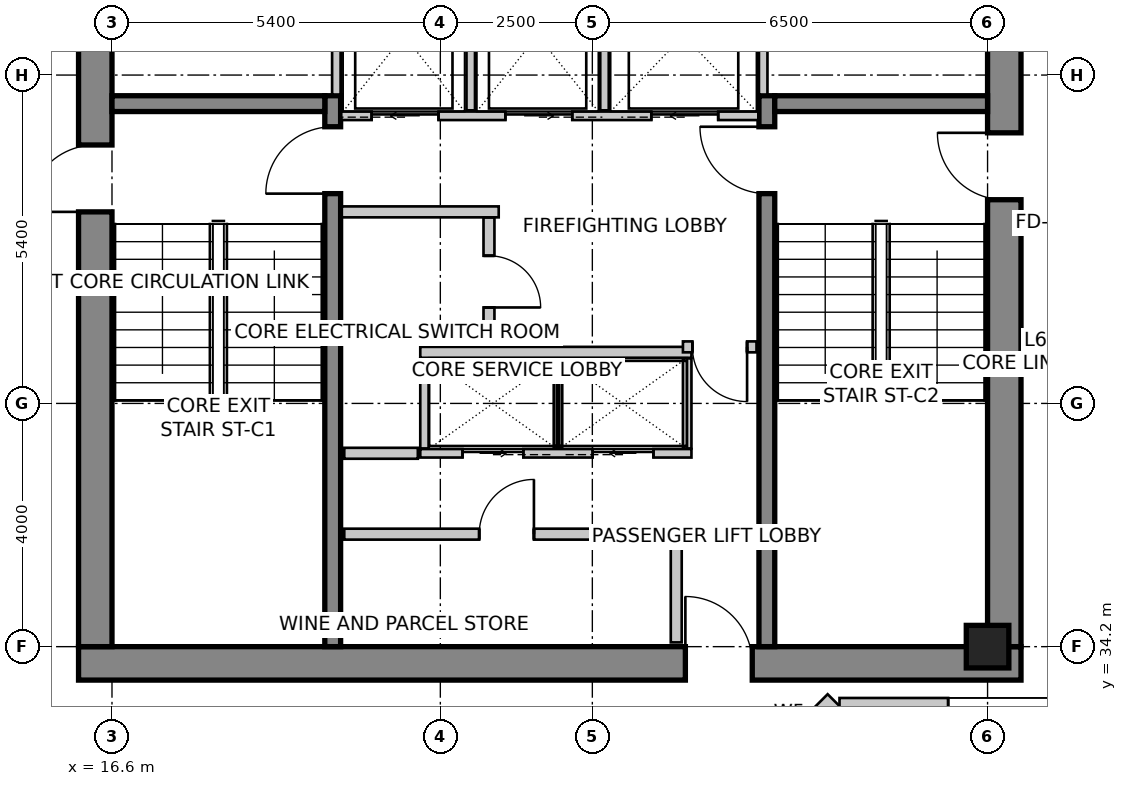
"""IFC4 building model, lengths in metres.
Left out: names, types, materials, properties, quantities, classifications, styles, units other than length and angle.
Written with IfcOpenShell. Run it as: python <this file> out.ifc"""

import sys

from ifc_helpers import new_model, si_unit, direction, frame, frame_2d, origin, origin_2d, place, context, subcontext, project, spatial, rectangle, extrude, source, transform, mapped, element, fill, save


model = new_model("IFC4")
c1 = context("Model", 3, precision=1e-05, world=origin(), true_north=direction((0.0, 1.0)))
c2 = subcontext(c1, "Body", "Model", "MODEL_VIEW")
j1 = project(units=[si_unit("LENGTHUNIT", "METRE"), si_unit("PLANEANGLEUNIT", "RADIAN")], contexts=[c1])
p1 = place(None, origin())
s1 = spatial("IfcSite", under=j1, at=p1, CompositionType="ELEMENT")
p2 = place(p1, origin())
s2 = spatial("IfcBuilding", under=s1, at=p2, CompositionType="ELEMENT")
p3 = place(p2, frame((0.0, 0.0, 270.9)))
s3 = spatial("IfcBuildingStorey", under=s2, at=p3, CompositionType="ELEMENT", Elevation=270.9)
p4 = place(p3, frame((16.05, 33.925, 0.0), z_axis=(0.0, 0.0, 1.0), x_axis=(1.0, 0.0, 0.0)))
e1 = element("IfcWall", 1, at=p4, inside=s3, PredefinedType="SHEAR", context=c2, shape_type="SweptSolid", body=[
    extrude(rectangle(XDim=15.5, YDim=0.55, at=frame_2d((7.75, 0.0))), origin(), (0.0, 0.0, 1.0), 3.6),
])
m1 = source(origin(), c2, "Body", "SweptSolid", [
    extrude(rectangle(XDim=1.1, YDim=2.15, at=frame_2d((0.55, 1.075))), frame((0.0, 0.285, 0.0), z_axis=(0.0, -1.0, 0.0), x_axis=(1.0, 0.0, 0.0)), (0.0, 0.0, 1.0), 0.57),
])
p5 = place(p4, frame((9.98, 0.0, 0.0)))
e2 = element("IfcOpeningElement", 2, at=p5, cuts=e1, PredefinedType="OPENING", context=c2, shape_type="MappedRepresentation", body=[
    mapped(m1, transform((0.0, 0.0, 0.0), scale=1.0)),
])
p6 = place(p3, frame((16.325, 34.2, 0.0), z_axis=(0.0, 0.0, 1.0), x_axis=(0.0, 1.0, 0.0)))
e3 = element("IfcWall", 3, at=p6, inside=s3, PredefinedType="SHEAR", context=c2, shape_type="SweptSolid", body=[
    extrude(rectangle(XDim=11.4, YDim=0.55, at=frame_2d((5.7, 0.0))), origin(), (0.0, 0.0, 1.0), 3.6),
])
p7 = place(p6, frame((7.15, 0.0, 0.0)))
e4 = element("IfcOpeningElement", 4, at=p7, cuts=e3, PredefinedType="OPENING", context=c2, shape_type="MappedRepresentation", body=[
    mapped(m1, transform((0.0, 0.0, 0.0), scale=1.0)),
])
p8 = place(p3, frame((31.275, 34.2, 0.0), z_axis=(0.0, 0.0, 1.0), x_axis=(0.0, 1.0, 0.0)))
e5 = element("IfcWall", 5, at=p8, inside=s3, PredefinedType="SHEAR", context=c2, shape_type="SweptSolid", body=[
    extrude(rectangle(XDim=11.4, YDim=0.55, at=frame_2d((5.7, 0.0))), origin(), (0.0, 0.0, 1.0), 3.6),
])
p9 = place(p8, frame((7.35, 0.0, 0.0)))
e6 = element("IfcOpeningElement", 6, at=p9, cuts=e5, PredefinedType="OPENING", context=c2, shape_type="MappedRepresentation", body=[
    mapped(m1, transform((0.0, 0.0, 0.0), scale=1.0)),
])
p10 = place(p3, frame((20.23, 34.2, 0.0), z_axis=(0.0, 0.0, 1.0), x_axis=(0.0, 1.0, 0.0)))
e7 = element("IfcWall", 7, at=p10, inside=s3, PredefinedType="SHEAR", context=c2, shape_type="SweptSolid", body=[
    extrude(rectangle(XDim=9.06, YDim=0.26, at=frame_2d((4.53, 0.0))), origin(), (0.0, 0.0, 1.0), 3.6),
])
m2 = source(origin(), c2, "Body", "SweptSolid", [
    extrude(rectangle(XDim=1.1, YDim=2.15, at=frame_2d((0.55, 1.075))), frame((0.0, 0.14, 0.0), z_axis=(0.0, -1.0, 0.0), x_axis=(1.0, 0.0, 0.0)), (0.0, 0.0, 1.0), 0.28),
])
p11 = place(p10, frame((7.45, 0.0, 0.0)))
e8 = element("IfcOpeningElement", 8, at=p11, cuts=e7, PredefinedType="OPENING", context=c2, shape_type="MappedRepresentation", body=[
    mapped(m2, transform((0.0, 0.0, 0.0), scale=1.0)),
])
p12 = place(p3, frame((27.37, 34.2, 0.0), z_axis=(0.0, 0.0, 1.0), x_axis=(0.0, 1.0, 0.0)))
e9 = element("IfcWall", 9, at=p12, inside=s3, PredefinedType="SHEAR", context=c2, shape_type="SweptSolid", body=[
    extrude(rectangle(XDim=9.06, YDim=0.26, at=frame_2d((4.53, 0.0))), origin(), (0.0, 0.0, 1.0), 3.6),
])
p13 = place(p12, frame((7.45, 0.0, 0.0)))
e10 = element("IfcOpeningElement", 10, at=p13, cuts=e9, PredefinedType="OPENING", context=c2, shape_type="MappedRepresentation", body=[
    mapped(m2, transform((0.0, 0.0, 0.0), scale=1.0)),
])
for number, where, z_axis, x_axis in (
    (11, (16.6, 43.13, 0.0), (0.0, 0.0, 1.0), (1.0, 0.0, 0.0)),
    (12, (27.5, 43.13, 0.0), (0.0, 0.0, 1.0), (1.0, 0.0, 0.0)),
):
    element("IfcWall", number, at=place(p3, frame(where, z_axis=z_axis, x_axis=x_axis)), inside=s3, PredefinedType="SHEAR", context=c2, shape_type="SweptSolid", body=[
        extrude(rectangle(XDim=3.5, YDim=0.26, at=frame_2d((1.75, 0.0))), origin(), (0.0, 0.0, 1.0), 3.6),
    ])
m3 = source(origin(), c2, "Body", "SweptSolid", [
    extrude(rectangle(XDim=0.7, YDim=0.7, at=origin_2d()), origin(), (0.0, 0.0, 1.0), 3.6),
])
p14 = place(p3, frame((31.0, 34.2, 0.0), z_axis=(0.0, 0.0, 1.0), x_axis=(1.0, 0.0, 0.0)))
e13 = element("IfcColumn", 13, at=p14, inside=s3, PredefinedType="COLUMN", context=c2, shape_type="MappedRepresentation", body=[
    mapped(m3, transform((0.0, 0.0, 0.0), scale=1.0)),
])
p15 = place(p3, frame((26.42, 31.256, 0.0), z_axis=(0.0, 0.0, 1.0), x_axis=(0.707106781187, 0.707106781187, 0.0)))
e14 = element("IfcWall", 14, at=p15, inside=s3, PredefinedType="SOLIDWALL", context=c2, shape_type="SweptSolid", body=[
    extrude(rectangle(XDim=2.907, YDim=0.3, at=frame_2d((1.454, 0.0))), origin(), (0.0, 0.0, 1.0), 3.35),
])
m4 = source(origin(), c2, "Body", "SweptSolid", [
    extrude(rectangle(XDim=1.2, YDim=1.6, at=frame_2d((0.6, 0.8))), frame((0.0, 0.16, 0.0), z_axis=(0.0, -1.0, 0.0), x_axis=(1.0, 0.0, 0.0)), (0.0, 0.0, 1.0), 0.32),
])
p16 = place(p15, frame((1.272, 0.0, 0.85)))
e15 = element("IfcOpeningElement", 15, at=p16, cuts=e14, PredefinedType="OPENING", context=c2, shape_type="MappedRepresentation", body=[
    mapped(m4, transform((0.0, 0.0, 0.0), scale=1.0)),
])
p17 = place(p3, frame((28.565, 33.206, 0.0), z_axis=(0.0, 0.0, 1.0), x_axis=(1.0, 0.0, 0.0)))
e16 = element("IfcWall", 16, at=p17, inside=s3, PredefinedType="SOLIDWALL", context=c2, shape_type="SweptSolid", body=[
    extrude(rectangle(XDim=13.423, YDim=0.3, at=frame_2d((6.711, 0.0))), origin(), (0.0, 0.0, 1.0), 3.35),
])
m5 = source(origin(), c2, "Body", "SweptSolid", [
    extrude(rectangle(XDim=1.6, YDim=2.15, at=frame_2d((0.8, 1.075))), frame((0.0, 0.16, 0.0), z_axis=(0.0, -1.0, 0.0), x_axis=(1.0, 0.0, 0.0)), (0.0, 0.0, 1.0), 0.32),
])
p18 = place(p17, frame((5.635, 0.0, 0.0)))
e17 = element("IfcOpeningElement", 17, at=p18, cuts=e16, PredefinedType="OPENING", context=c2, shape_type="MappedRepresentation", body=[
    mapped(m5, transform((0.0, 0.0, 0.0), scale=1.0)),
])
m6 = source(origin(), c2, "Body", "SweptSolid", [
    extrude(rectangle(XDim=2.1, YDim=2.0, at=frame_2d((1.05, 1.0))), frame((0.0, 0.16, 0.0), z_axis=(0.0, -1.0, 0.0), x_axis=(1.0, 0.0, 0.0)), (0.0, 0.0, 1.0), 0.32),
])
p19 = place(p17, frame((1.787, 0.0, 0.85)))
e18 = element("IfcOpeningElement", 18, at=p19, cuts=e16, PredefinedType="OPENING", context=c2, shape_type="MappedRepresentation", body=[
    mapped(m6, transform((0.0, 0.0, 0.0), scale=1.0)),
])
p20 = place(p17, frame((9.259, 0.0, 0.85)))
e19 = element("IfcOpeningElement", 19, at=p20, cuts=e16, PredefinedType="OPENING", context=c2, shape_type="MappedRepresentation", body=[
    mapped(m6, transform((0.0, 0.0, 0.0), scale=1.0)),
])
p21 = place(p3, frame((20.37, 42.93, 0.0), z_axis=(0.0, 0.0, 1.0), x_axis=(1.0, 0.0, 0.0)))
e20 = element("IfcWall", 20, at=p21, inside=s3, PredefinedType="SOLIDWALL", context=c2, shape_type="SweptSolid", body=[
    extrude(rectangle(XDim=6.86, YDim=0.14, at=frame_2d((3.43, 0.0))), origin(), (0.0, 0.0, 1.0), 3.35),
])
m7 = source(origin(), c2, "Body", "SweptSolid", [
    extrude(rectangle(XDim=1.1, YDim=2.15, at=frame_2d((0.55, 1.075))), frame((0.0, 0.08, 0.0), z_axis=(0.0, -1.0, 0.0), x_axis=(1.0, 0.0, 0.0)), (0.0, 0.0, 1.0), 0.16),
])
p22 = place(p21, frame((0.5, 0.0, 0.0)))
e21 = element("IfcOpeningElement", 21, at=p22, cuts=e20, PredefinedType="OPENING", context=c2, shape_type="MappedRepresentation", body=[
    mapped(m7, transform((0.0, 0.0, 0.0), scale=1.0)),
])
p23 = place(p21, frame((2.7, 0.0, 0.0)))
e22 = element("IfcOpeningElement", 22, at=p23, cuts=e20, PredefinedType="OPENING", context=c2, shape_type="MappedRepresentation", body=[
    mapped(m7, transform((0.0, 0.0, 0.0), scale=1.0)),
])
p24 = place(p21, frame((5.1, 0.0, 0.0)))
e23 = element("IfcOpeningElement", 23, at=p24, cuts=e20, PredefinedType="OPENING", context=c2, shape_type="MappedRepresentation", body=[
    mapped(m7, transform((0.0, 0.0, 0.0), scale=1.0)),
])
for number, where, z_axis, x_axis in (
    (24, (20.29, 43.28, 0.0), (0.0, 0.0, 1.0), (0.0, 1.0, 0.0)),
    (25, (27.31, 43.28, 0.0), (0.0, 0.0, 1.0), (0.0, 1.0, 0.0)),
):
    element("IfcWall", number, at=place(p3, frame(where, z_axis=z_axis, x_axis=x_axis)), inside=s3, PredefinedType="SOLIDWALL", context=c2, shape_type="SweptSolid", body=[
        extrude(rectangle(XDim=2.3, YDim=0.14, at=frame_2d((1.15, 0.0))), origin(), (0.0, 0.0, 1.0), 3.35),
    ])
for number, where, z_axis, x_axis in (
    (26, (22.5, 43.02, 0.0), (0.0, 0.0, 1.0), (0.0, 1.0, 0.0)),
    (27, (24.7, 43.02, 0.0), (0.0, 0.0, 1.0), (0.0, 1.0, 0.0)),
):
    element("IfcWall", number, at=place(p3, frame(where, z_axis=z_axis, x_axis=x_axis)), inside=s3, PredefinedType="SOLIDWALL", context=c2, shape_type="SweptSolid", body=[
        extrude(rectangle(XDim=2.56, YDim=0.14, at=frame_2d((1.28, 0.0))), origin(), (0.0, 0.0, 1.0), 3.35),
    ])
p25 = place(p3, frame((21.67, 37.38, 0.0), z_axis=(0.0, 0.0, 1.0), x_axis=(1.0, 0.0, 0.0)))
e28 = element("IfcWall", 28, at=p25, inside=s3, PredefinedType="SOLIDWALL", context=c2, shape_type="SweptSolid", body=[
    extrude(rectangle(XDim=4.46, YDim=0.14, at=frame_2d((2.23, 0.0))), origin(), (0.0, 0.0, 1.0), 3.35),
])
m8 = source(origin(), c2, "Body", "SweptSolid", [
    extrude(rectangle(XDim=1.0, YDim=2.15, at=frame_2d((0.5, 1.075))), frame((0.0, 0.08, 0.0), z_axis=(0.0, -1.0, 0.0), x_axis=(1.0, 0.0, 0.0)), (0.0, 0.0, 1.0), 0.16),
])
p26 = place(p25, frame((0.695, 0.0, 0.0)))
e29 = element("IfcOpeningElement", 29, at=p26, cuts=e28, PredefinedType="OPENING", context=c2, shape_type="MappedRepresentation", body=[
    mapped(m8, transform((0.0, 0.0, 0.0), scale=1.0)),
])
p27 = place(p25, frame((2.835, 0.0, 0.0)))
e30 = element("IfcOpeningElement", 30, at=p27, cuts=e28, PredefinedType="OPENING", context=c2, shape_type="MappedRepresentation", body=[
    mapped(m8, transform((0.0, 0.0, 0.0), scale=1.0)),
])
p28 = place(p3, frame((21.67, 39.04, 0.0), z_axis=(0.0, 0.0, 1.0), x_axis=(1.0, 0.0, 0.0)))
e31 = element("IfcWall", 31, at=p28, inside=s3, PredefinedType="SOLIDWALL", context=c2, shape_type="SweptSolid", body=[
    extrude(rectangle(XDim=4.46, YDim=0.18, at=frame_2d((2.23, 0.0))), origin(), (0.0, 0.0, 1.0), 3.35),
])
for number, where, z_axis, x_axis in (
    (32, (26.06, 37.46, 0.0), (0.0, 0.0, 1.0), (0.0, 1.0, 0.0)),
    (33, (21.74, 37.46, 0.0), (0.0, 0.0, 1.0), (0.0, 1.0, 0.0)),
    (34, (23.935, 37.46, 0.0), (0.0, 0.0, 1.0), (0.0, 1.0, 0.0)),
):
    element("IfcWall", number, at=place(p3, frame(where, z_axis=z_axis, x_axis=x_axis)), inside=s3, PredefinedType="SOLIDWALL", context=c2, shape_type="SweptSolid", body=[
        extrude(rectangle(XDim=1.48, YDim=0.14, at=frame_2d((0.74, 0.0))), origin(), (0.0, 0.0, 1.0), 3.35),
    ])
p29 = place(p3, frame((22.96, 41.35, 0.0), z_axis=(0.0, 0.0, 1.0), x_axis=(-1.0, 0.0, 0.0)))
e35 = element("IfcWall", 35, at=p29, inside=s3, PredefinedType="PARTITIONING", context=c2, shape_type="SweptSolid", body=[
    extrude(rectangle(XDim=2.58, YDim=0.18, at=frame_2d((1.29, 0.0))), origin(), (0.0, 0.0, 1.0), 3.35),
])
p30 = place(p3, frame((22.8, 41.256, 0.0), z_axis=(0.0, 0.0, 1.0), x_axis=(0.0, -1.0, 0.0)))
e36 = element("IfcWall", 36, at=p30, inside=s3, PredefinedType="PARTITIONING", context=c2, shape_type="SweptSolid", body=[
    extrude(rectangle(XDim=2.106, YDim=0.18, at=frame_2d((1.053, 0.0))), origin(), (0.0, 0.0, 1.0), 3.35),
])
m9 = source(origin(), c2, "Body", "SweptSolid", [
    extrude(rectangle(XDim=0.85, YDim=2.15, at=frame_2d((0.425, 1.075))), frame((0.0, 0.1, 0.0), z_axis=(0.0, -1.0, 0.0), x_axis=(1.0, 0.0, 0.0)), (0.0, 0.0, 1.0), 0.2),
])
p31 = place(p30, frame((0.628, 0.0, 0.0)))
e37 = element("IfcOpeningElement", 37, at=p31, cuts=e36, PredefinedType="OPENING", context=c2, shape_type="MappedRepresentation", body=[
    mapped(m9, transform((0.0, 0.0, 0.0), scale=1.0)),
])
p32 = place(p3, frame((21.63, 37.38, 0.0), z_axis=(0.0, 0.0, 1.0), x_axis=(-1.0, 0.0, 0.0)))
e38 = element("IfcWall", 38, at=p32, inside=s3, PredefinedType="PARTITIONING", context=c2, shape_type="SweptSolid", body=[
    extrude(rectangle(XDim=1.21, YDim=0.18, at=frame_2d((0.605, 0.0))), origin(), (0.0, 0.0, 1.0), 3.35),
])
p33 = place(p3, frame((27.2, 39.13, 0.0), z_axis=(0.0, 0.0, 1.0), x_axis=(-1.0, 0.0, 0.0)))
e39 = element("IfcWall", 39, at=p33, inside=s3, PredefinedType="PARTITIONING", context=c2, shape_type="SweptSolid", body=[
    extrude(rectangle(XDim=1.21, YDim=0.18, at=frame_2d((0.605, 0.0))), origin(), (0.0, 0.0, 1.0), 3.35),
])
m10 = source(origin(), c2, "Body", "SweptSolid", [
    extrude(rectangle(XDim=0.9, YDim=2.15, at=frame_2d((0.45, 1.075))), frame((0.0, 0.1, 0.0), z_axis=(0.0, -1.0, 0.0), x_axis=(1.0, 0.0, 0.0)), (0.0, 0.0, 1.0), 0.2),
])
p34 = place(p33, frame((0.155, 0.0, 0.0)))
e40 = element("IfcOpeningElement", 40, at=p34, cuts=e39, PredefinedType="OPENING", context=c2, shape_type="MappedRepresentation", body=[
    mapped(m10, transform((0.0, 0.0, 0.0), scale=1.0)),
])
p35 = place(p3, frame((20.42, 36.05, 0.0), z_axis=(0.0, 0.0, 1.0), x_axis=(1.0, 0.0, 0.0)))
e41 = element("IfcWall", 41, at=p35, inside=s3, PredefinedType="PARTITIONING", context=c2, shape_type="SweptSolid", body=[
    extrude(rectangle(XDim=5.46, YDim=0.18, at=frame_2d((2.73, 0.0))), origin(), (0.0, 0.0, 1.0), 3.35),
])
p36 = place(p35, frame((2.219, 0.0, 0.0)))
e42 = element("IfcOpeningElement", 42, at=p36, cuts=e41, PredefinedType="OPENING", context=c2, shape_type="MappedRepresentation", body=[
    mapped(m10, transform((0.0, 0.0, 0.0), scale=1.0)),
])
p37 = place(p3, frame((25.88, 35.956, 0.0), z_axis=(0.0, 0.0, 1.0), x_axis=(0.0, -1.0, 0.0)))
e43 = element("IfcWall", 43, at=p37, inside=s3, PredefinedType="PARTITIONING", context=c2, shape_type="SweptSolid", body=[
    extrude(rectangle(XDim=1.686, YDim=0.18, at=frame_2d((0.843, 0.0))), origin(), (0.0, 0.0, 1.0), 2.642),
])
m11 = source(origin(), c2, "Body", "SweptSolid", [
    extrude(rectangle(XDim=1.1, YDim=2.15, at=frame_2d((0.55, 1.075))), frame((0.0, 0.025, 0.0), z_axis=(0.0, -1.0, 0.0), x_axis=(1.0, 0.0, 0.0)), (0.0, 0.0, 1.0), 0.05),
])
p38 = place(p22, origin())
e44 = element("IfcDoor", 44, at=p38, inside=s3, OperationType="SLIDING_TO_LEFT", PredefinedType="DOOR", context=c2, shape_type="MappedRepresentation", body=[
    mapped(m11, transform((0.0, 0.0, 0.0), scale=1.0)),
])
fill(e21, e44)
p39 = place(p23, origin())
e45 = element("IfcDoor", 45, at=p39, inside=s3, OperationType="SLIDING_TO_RIGHT", PredefinedType="DOOR", context=c2, shape_type="MappedRepresentation", body=[
    mapped(m11, transform((0.0, 0.0, 0.0), scale=1.0)),
])
fill(e22, e45)
m12 = source(origin(), c2, "Body", "SweptSolid", [
    extrude(rectangle(XDim=1.1, YDim=2.15, at=frame_2d((0.55, 1.075))), frame((0.0, 0.025, 0.0), z_axis=(0.0, -1.0, 0.0), x_axis=(1.0, 0.0, 0.0)), (0.0, 0.0, 1.0), 0.05),
])
p40 = place(p24, origin())
e46 = element("IfcDoor", 46, at=p40, inside=s3, OperationType="SLIDING_TO_LEFT", PredefinedType="DOOR", context=c2, shape_type="MappedRepresentation", body=[
    mapped(m12, transform((0.0, 0.0, 0.0), scale=1.0)),
])
fill(e23, e46)
m13 = source(origin(), c2, "Body", "SweptSolid", [
    extrude(rectangle(XDim=1.0, YDim=2.15, at=frame_2d((0.5, 1.075))), frame((0.0, 0.025, 0.0), z_axis=(0.0, -1.0, 0.0), x_axis=(1.0, 0.0, 0.0)), (0.0, 0.0, 1.0), 0.05),
])
p41 = place(p26, origin())
e47 = element("IfcDoor", 47, at=p41, inside=s3, OperationType="SLIDING_TO_RIGHT", PredefinedType="DOOR", context=c2, shape_type="MappedRepresentation", body=[
    mapped(m13, transform((0.0, 0.0, 0.0), scale=1.0)),
])
fill(e29, e47)
p42 = place(p27, origin())
e48 = element("IfcDoor", 48, at=p42, inside=s3, OperationType="SLIDING_TO_LEFT", PredefinedType="DOOR", context=c2, shape_type="MappedRepresentation", body=[
    mapped(m13, transform((0.0, 0.0, 0.0), scale=1.0)),
])
fill(e30, e48)
m14 = source(origin(), c2, "Body", "SweptSolid", [
    extrude(rectangle(XDim=1.1, YDim=2.15, at=frame_2d((0.55, 1.075))), frame((0.0, 0.025, 0.0), z_axis=(0.0, -1.0, 0.0), x_axis=(1.0, 0.0, 0.0)), (0.0, 0.0, 1.0), 0.05),
])
p43 = place(p11, origin())
e49 = element("IfcDoor", 49, at=p43, inside=s3, OperationType="SINGLE_SWING_LEFT", PredefinedType="DOOR", context=c2, shape_type="MappedRepresentation", body=[
    mapped(m14, transform((0.0, 0.0, 0.0), scale=1.0)),
])
fill(e8, e49)
p44 = place(p13, origin())
e50 = element("IfcDoor", 50, at=p44, inside=s3, OperationType="SINGLE_SWING_RIGHT", PredefinedType="DOOR", context=c2, shape_type="MappedRepresentation", body=[
    mapped(m14, transform((0.0, 0.0, 0.0), scale=1.0)),
])
fill(e10, e50)
p45 = place(p7, origin())
e51 = element("IfcDoor", 51, at=p45, inside=s3, OperationType="SINGLE_SWING_LEFT", PredefinedType="DOOR", context=c2, shape_type="MappedRepresentation", body=[
    mapped(m14, transform((0.0, 0.0, 0.0), scale=1.0)),
])
fill(e4, e51)
p46 = place(p9, origin())
e52 = element("IfcDoor", 52, at=p46, inside=s3, OperationType="SINGLE_SWING_RIGHT", PredefinedType="DOOR", context=c2, shape_type="MappedRepresentation", body=[
    mapped(m14, transform((0.0, 0.0, 0.0), scale=1.0)),
])
fill(e6, e52)
p47 = place(p5, origin())
e53 = element("IfcDoor", 53, at=p47, inside=s3, OperationType="SINGLE_SWING_LEFT", PredefinedType="DOOR", context=c2, shape_type="MappedRepresentation", body=[
    mapped(m14, transform((0.0, 0.0, 0.0), scale=1.0)),
])
fill(e2, e53)
m15 = source(origin(), c2, "Body", "SweptSolid", [
    extrude(rectangle(XDim=0.85, YDim=2.15, at=frame_2d((0.425, 1.075))), frame((0.0, 0.025, 0.0), z_axis=(0.0, -1.0, 0.0), x_axis=(1.0, 0.0, 0.0)), (0.0, 0.0, 1.0), 0.05),
])
p48 = place(p31, origin())
e54 = element("IfcDoor", 54, at=p48, inside=s3, OperationType="SINGLE_SWING_RIGHT", PredefinedType="DOOR", context=c2, shape_type="MappedRepresentation", body=[
    mapped(m15, transform((0.0, 0.0, 0.0), scale=1.0)),
])
fill(e37, e54)
m16 = source(origin(), c2, "Body", "SweptSolid", [
    extrude(rectangle(XDim=0.9, YDim=2.15, at=frame_2d((0.45, 1.075))), frame((0.0, 0.025, 0.0), z_axis=(0.0, -1.0, 0.0), x_axis=(1.0, 0.0, 0.0)), (0.0, 0.0, 1.0), 0.05),
])
p49 = place(p34, origin())
e55 = element("IfcDoor", 55, at=p49, inside=s3, OperationType="SINGLE_SWING_LEFT", PredefinedType="DOOR", context=c2, shape_type="MappedRepresentation", body=[
    mapped(m16, transform((0.0, 0.0, 0.0), scale=1.0)),
])
fill(e40, e55)
p50 = place(p36, origin())
e56 = element("IfcDoor", 56, at=p50, inside=s3, OperationType="SINGLE_SWING_RIGHT", PredefinedType="DOOR", context=c2, shape_type="MappedRepresentation", body=[
    mapped(m16, transform((0.0, 0.0, 0.0), scale=1.0)),
])
fill(e42, e56)
save(model, sys.argv[1])
